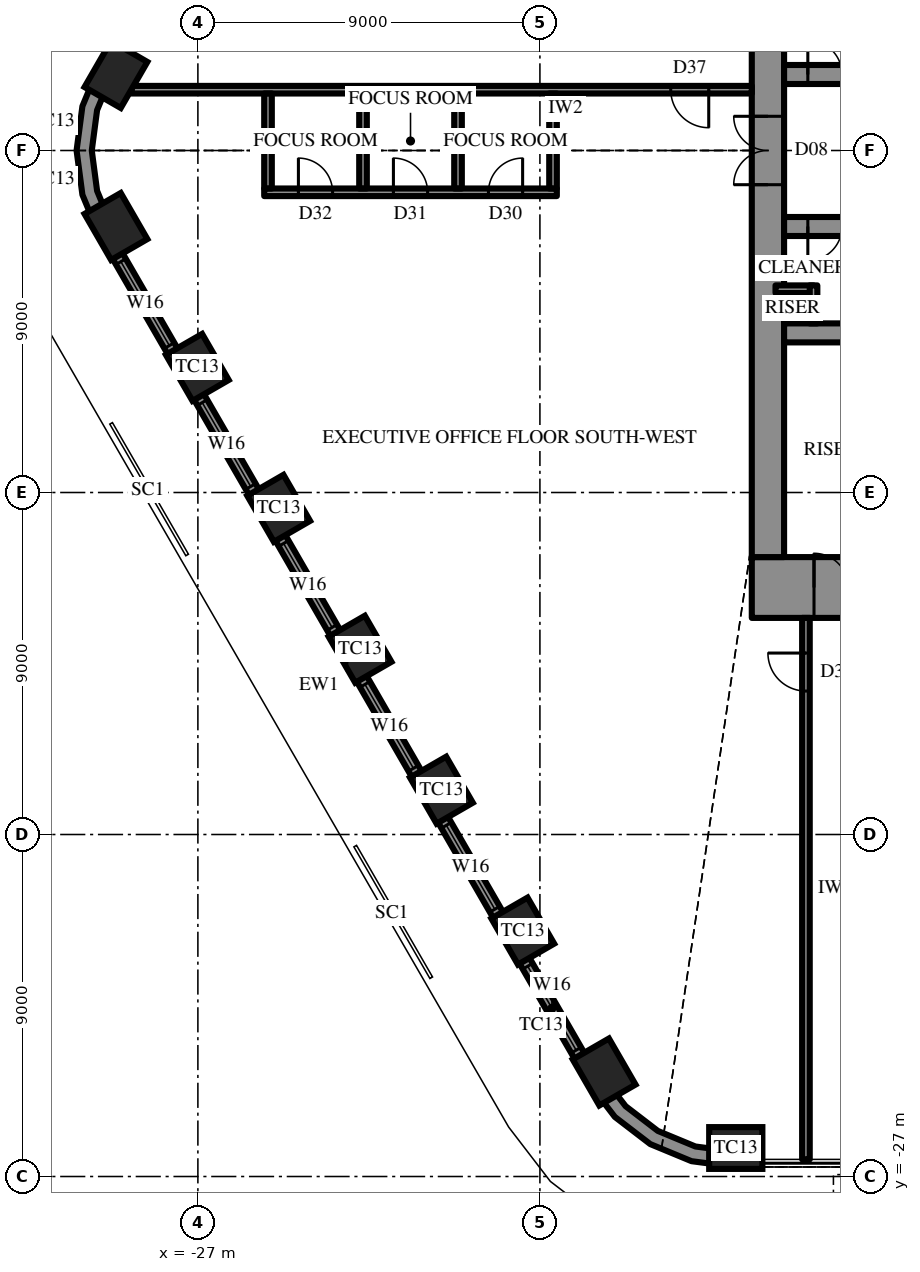
"""IFC4 building model, lengths in metres.
Left out: names, types, materials, properties, quantities, classifications, styles, units other than length and angle.
Written with IfcOpenShell. Run it as: python <this file> out.ifc"""

import sys

from ifc_helpers import new_model, si_unit, direction, frame, frame_2d, origin, origin_2d, place, context, subcontext, project, spatial, polyline, rectangle, outline, extrude, element, fill, save


model = new_model("IFC4")
c1 = context("Model", 3, precision=1e-05, world=origin(), true_north=direction((0.0, 1.0)))
c2 = subcontext(c1, "Body", "Model", "MODEL_VIEW")
j1 = project(units=[si_unit("LENGTHUNIT", "METRE"), si_unit("PLANEANGLEUNIT", "RADIAN")], contexts=[c1])
p1 = place(None, origin())
s1 = spatial("IfcSite", under=j1, at=p1, CompositionType="ELEMENT")
p2 = place(p1, origin())
s2 = spatial("IfcBuilding", under=s1, at=p2, CompositionType="ELEMENT")
p3 = place(p2, frame((0.0, 0.0, 319.9)))
s3 = spatial("IfcBuildingStorey", under=s2, at=p3, CompositionType="ELEMENT", Elevation=319.9)
for number, where, z_axis, x_axis in (
    (1, (-29.156, 2.0, 0.0), (0.0, 0.0, 1.0), (-0.5, -0.866, 0.0)),
    (2, (-29.156, -2.0, 0.0), (0.0, 0.0, 1.0), (0.5, -0.866, 0.0)),
    (3, (-27.015, -5.708, 0.0), (0.0, 0.0, 1.0), (0.5, -0.866, 0.0)),
    (4, (-24.874, -9.417, 0.0), (0.0, 0.0, 1.0), (0.5, -0.866, 0.0)),
    (5, (-22.733, -13.125, 0.0), (0.0, 0.0, 1.0), (0.5, -0.866, 0.0)),
    (6, (-20.592, -16.833, 0.0), (0.0, 0.0, 1.0), (0.5, -0.866, 0.0)),
    (7, (-18.451, -20.542, 0.0), (0.0, 0.0, 1.0), (0.5, -0.866, 0.0)),
    (8, (-16.31, -24.25, 0.0), (0.0, 0.0, 1.0), (0.5, -0.866, 0.0)),
    (9, (-12.846, -26.25, 0.0), (0.0, 0.0, 1.0), (1.0, 0.0, 0.0)),
):
    element("IfcColumn", number, at=place(p3, frame(where, z_axis=z_axis, x_axis=x_axis)), inside=s3, PredefinedType="COLUMN", context=c2, shape_type="SweptSolid", body=[
        extrude(rectangle(XDim=1.4, YDim=1.1, at=origin_2d()), origin(), (0.0, 0.0, 1.0), 4.2),
    ])
p4 = place(p3, frame((12.425, -11.5, 0.0), z_axis=(0.0, 0.0, 1.0), x_axis=(-1.0, 0.0, 0.0)))
e10 = element("IfcWall", 10, at=p4, inside=s3, PredefinedType="SHEAR", context=c2, shape_type="SweptSolid", body=[
    extrude(rectangle(XDim=24.85, YDim=1.6, at=frame_2d((12.425, 0.0))), origin(), (0.0, 0.0, 1.0), 4.2),
])
p5 = place(p4, frame((13.275, 0.0, 0.0)))
e11 = element("IfcOpeningElement", 11, at=p5, cuts=e10, PredefinedType="OPENING", context=c2, shape_type="SweptSolid", body=[
    extrude(rectangle(XDim=0.9, YDim=2.2, at=frame_2d((0.45, 1.1))), frame((0.0, 0.81, 0.0), z_axis=(0.0, -1.0, 0.0), x_axis=(1.0, 0.0, 0.0)), (0.0, 0.0, 1.0), 1.62),
])
p6 = place(p4, frame((16.275, 0.0, 0.0)))
e12 = element("IfcOpeningElement", 12, at=p6, cuts=e10, PredefinedType="OPENING", context=c2, shape_type="SweptSolid", body=[
    extrude(rectangle(XDim=0.9, YDim=2.2, at=frame_2d((0.45, 1.1))), frame((0.0, 0.81, 0.0), z_axis=(0.0, -1.0, 0.0), x_axis=(1.0, 0.0, 0.0)), (0.0, 0.0, 1.0), 1.62),
])
p7 = place(p4, frame((19.325, 0.0, 0.0)))
e13 = element("IfcOpeningElement", 13, at=p7, cuts=e10, PredefinedType="OPENING", context=c2, shape_type="SweptSolid", body=[
    extrude(rectangle(XDim=1.0, YDim=2.2, at=frame_2d((0.5, 1.1))), frame((0.0, 0.81, 0.0), z_axis=(0.0, -1.0, 0.0), x_axis=(1.0, 0.0, 0.0)), (0.0, 0.0, 1.0), 1.62),
])
p8 = place(p4, frame((1.637, 0.0, 0.0)))
e14 = element("IfcOpeningElement", 14, at=p8, cuts=e10, PredefinedType="OPENING", context=c2, shape_type="SweptSolid", body=[
    extrude(rectangle(XDim=0.9, YDim=2.2, at=frame_2d((0.45, 1.1))), frame((0.0, 0.81, 0.0), z_axis=(0.0, -1.0, 0.0), x_axis=(1.0, 0.0, 0.0)), (0.0, 0.0, 1.0), 1.62),
])
p9 = place(p4, frame((22.312, 0.0, 0.0)))
e15 = element("IfcOpeningElement", 15, at=p9, cuts=e10, PredefinedType="OPENING", context=c2, shape_type="SweptSolid", body=[
    extrude(rectangle(XDim=0.9, YDim=2.2, at=frame_2d((0.45, 1.1))), frame((0.0, 0.81, 0.0), z_axis=(0.0, -1.0, 0.0), x_axis=(1.0, 0.0, 0.0)), (0.0, 0.0, 1.0), 1.62),
])
p10 = place(p3, frame((-12.0, 10.7, 0.0), z_axis=(0.0, 0.0, 1.0), x_axis=(0.0, -1.0, 0.0)))
e16 = element("IfcWall", 16, at=p10, inside=s3, PredefinedType="SHEAR", context=c2, shape_type="SweptSolid", body=[
    extrude(rectangle(XDim=21.4, YDim=0.85, at=frame_2d((10.7, 0.0))), origin(), (0.0, 0.0, 1.0), 4.2),
])
p11 = place(p10, frame((9.8, 0.0, 0.0)))
e17 = element("IfcOpeningElement", 17, at=p11, cuts=e16, PredefinedType="OPENING", context=c2, shape_type="SweptSolid", body=[
    extrude(rectangle(XDim=1.8, YDim=2.4, at=frame_2d((0.9, 1.2))), frame((0.0, 0.435, 0.0), z_axis=(0.0, -1.0, 0.0), x_axis=(1.0, 0.0, 0.0)), (0.0, 0.0, 1.0), 0.87),
])
p12 = place(p3, frame((-11.575, 2.0, 0.0), z_axis=(0.0, 0.0, 1.0), x_axis=(1.0, 0.0, 0.0)))
e18 = element("IfcWall", 18, at=p12, inside=s3, PredefinedType="SHEAR", context=c2, shape_type="SweptSolid", body=[
    extrude(rectangle(XDim=5.775, YDim=0.5, at=frame_2d((2.887, 0.0))), origin(), (0.0, 0.0, 1.0), 4.2),
])
p13 = place(p12, frame((0.625, 0.0, 0.0)))
e19 = element("IfcOpeningElement", 19, at=p13, cuts=e18, PredefinedType="OPENING", context=c2, shape_type="SweptSolid", body=[
    extrude(rectangle(XDim=0.9, YDim=2.2, at=frame_2d((0.45, 1.1))), frame((0.0, 0.26, 0.0), z_axis=(0.0, -1.0, 0.0), x_axis=(1.0, 0.0, 0.0)), (0.0, 0.0, 1.0), 0.52),
])
p14 = place(p3, frame((3.2, -2.0, 0.0), z_axis=(0.0, 0.0, 1.0), x_axis=(-1.0, 0.0, 0.0)))
e20 = element("IfcWall", 20, at=p14, inside=s3, PredefinedType="SHEAR", context=c2, shape_type="SweptSolid", body=[
    extrude(rectangle(XDim=14.775, YDim=0.5, at=frame_2d((7.387, 0.0))), origin(), (0.0, 0.0, 1.0), 4.2),
])
p15 = place(p14, frame((13.25, 0.0, 0.0)))
e21 = element("IfcOpeningElement", 21, at=p15, cuts=e20, PredefinedType="OPENING", context=c2, shape_type="SweptSolid", body=[
    extrude(rectangle(XDim=0.9, YDim=2.2, at=frame_2d((0.45, 1.1))), frame((0.0, 0.26, 0.0), z_axis=(0.0, -1.0, 0.0), x_axis=(1.0, 0.0, 0.0)), (0.0, 0.0, 1.0), 0.52),
])
p16 = place(p14, frame((1.15, 0.0, 0.0)))
e22 = element("IfcOpeningElement", 22, at=p16, cuts=e20, PredefinedType="OPENING", context=c2, shape_type="SweptSolid", body=[
    extrude(rectangle(XDim=1.1, YDim=2.2, at=frame_2d((0.55, 1.1))), frame((0.0, 0.26, 0.0), z_axis=(0.0, -1.0, 0.0), x_axis=(1.0, 0.0, 0.0)), (0.0, 0.0, 1.0), 0.52),
])
p17 = place(p14, frame((4.15, 0.0, 0.0)))
e23 = element("IfcOpeningElement", 23, at=p17, cuts=e20, PredefinedType="OPENING", context=c2, shape_type="SweptSolid", body=[
    extrude(rectangle(XDim=1.1, YDim=2.2, at=frame_2d((0.55, 1.1))), frame((0.0, 0.26, 0.0), z_axis=(0.0, -1.0, 0.0), x_axis=(1.0, 0.0, 0.0)), (0.0, 0.0, 1.0), 0.52),
])
p18 = place(p14, frame((7.15, 0.0, 0.0)))
e24 = element("IfcOpeningElement", 24, at=p18, cuts=e20, PredefinedType="OPENING", context=c2, shape_type="SweptSolid", body=[
    extrude(rectangle(XDim=1.1, YDim=2.2, at=frame_2d((0.55, 1.1))), frame((0.0, 0.26, 0.0), z_axis=(0.0, -1.0, 0.0), x_axis=(1.0, 0.0, 0.0)), (0.0, 0.0, 1.0), 0.52),
])
p19 = place(p14, frame((10.15, 0.0, 0.0)))
e25 = element("IfcOpeningElement", 25, at=p19, cuts=e20, PredefinedType="OPENING", context=c2, shape_type="SweptSolid", body=[
    extrude(rectangle(XDim=1.1, YDim=2.2, at=frame_2d((0.55, 1.1))), frame((0.0, 0.26, 0.0), z_axis=(0.0, -1.0, 0.0), x_axis=(1.0, 0.0, 0.0)), (0.0, 0.0, 1.0), 0.52),
])
p20 = place(p3, frame((11.575, -4.8, 0.0), z_axis=(0.0, 0.0, 1.0), x_axis=(-1.0, 0.0, 0.0)))
e26 = element("IfcWall", 26, at=p20, inside=s3, PredefinedType="SHEAR", context=c2, shape_type="SweptSolid", body=[
    extrude(rectangle(XDim=23.15, YDim=0.5, at=frame_2d((11.575, 0.0))), origin(), (0.0, 0.0, 1.0), 4.2),
])
p21 = place(p20, frame((6.475, 0.0, 0.0)))
e27 = element("IfcOpeningElement", 27, at=p21, cuts=e26, PredefinedType="OPENING", context=c2, shape_type="SweptSolid", body=[
    extrude(rectangle(XDim=1.2, YDim=2.2, at=frame_2d((0.6, 1.1))), frame((0.0, 0.26, 0.0), z_axis=(0.0, -1.0, 0.0), x_axis=(1.0, 0.0, 0.0)), (0.0, 0.0, 1.0), 0.52),
])
p22 = place(p20, frame((3.475, 0.0, 0.0)))
e28 = element("IfcOpeningElement", 28, at=p22, cuts=e26, PredefinedType="OPENING", context=c2, shape_type="SweptSolid", body=[
    extrude(rectangle(XDim=1.2, YDim=2.2, at=frame_2d((0.6, 1.1))), frame((0.0, 0.26, 0.0), z_axis=(0.0, -1.0, 0.0), x_axis=(1.0, 0.0, 0.0)), (0.0, 0.0, 1.0), 0.52),
])
p23 = place(p3, origin())
e29 = element("IfcWall", 29, at=p23, inside=s3, PredefinedType="SOLIDWALL", context=c2, shape_type="SweptSolid", body=[
    extrude(outline(polyline([(-29.589, 2.25), (-30.039, 1.165), (-30.192, 0.0), (-30.039, -1.165), (-29.589, -2.25), (-29.243, -2.05), (-29.652, -1.061), (-29.792, 0.0), (-29.652, 1.061), (-29.243, 2.05), (-29.589, 2.25)])), origin(), (0.0, 0.0, 1.0), 2.0),
])
p24 = place(p3, origin())
e30 = element("IfcWall", 30, at=p24, inside=s3, PredefinedType="SOLIDWALL", context=c2, shape_type="SweptSolid", body=[
    extrude(outline(polyline([(-16.743, -24.5), (-16.028, -25.432), (-15.096, -26.147), (-14.011, -26.597), (-12.846, -26.75), (-12.846, -26.35), (-13.907, -26.21), (-14.896, -25.801), (-15.745, -25.149), (-16.397, -24.3), (-16.743, -24.5)])), origin(), (0.0, 0.0, 1.0), 2.0),
])
p25 = place(p3, frame((-29.459, -2.175, 0.0), z_axis=(0.0, 0.0, 1.0), x_axis=(0.499997191038, -0.866027025533, 0.0)))
e31 = element("IfcWall", 31, at=p25, inside=s3, PredefinedType="SOLIDWALL", context=c2, shape_type="SweptSolid", body=[
    extrude(rectangle(XDim=25.692, YDim=0.3, at=frame_2d((12.846, 0.0))), origin(), (0.0, 0.0, 1.0), 2.0),
])
p26 = place(p25, frame((0.866, 0.0, 0.6)))
e32 = element("IfcOpeningElement", 32, at=p26, cuts=e31, PredefinedType="OPENING", context=c2, shape_type="SweptSolid", body=[
    extrude(rectangle(XDim=2.55, YDim=1.15, at=frame_2d((1.275, 0.575))), frame((0.0, 0.16, 0.0), z_axis=(0.0, -1.0, 0.0), x_axis=(1.0, 0.0, 0.0)), (0.0, 0.0, 1.0), 0.32),
])
p27 = place(p25, frame((5.148, 0.0, 0.6)))
e33 = element("IfcOpeningElement", 33, at=p27, cuts=e31, PredefinedType="OPENING", context=c2, shape_type="SweptSolid", body=[
    extrude(rectangle(XDim=2.55, YDim=1.15, at=frame_2d((1.275, 0.575))), frame((0.0, 0.16, 0.0), z_axis=(0.0, -1.0, 0.0), x_axis=(1.0, 0.0, 0.0)), (0.0, 0.0, 1.0), 0.32),
])
p28 = place(p25, frame((9.43, 0.0, 0.6)))
e34 = element("IfcOpeningElement", 34, at=p28, cuts=e31, PredefinedType="OPENING", context=c2, shape_type="SweptSolid", body=[
    extrude(rectangle(XDim=2.55, YDim=1.15, at=frame_2d((1.275, 0.575))), frame((0.0, 0.16, 0.0), z_axis=(0.0, -1.0, 0.0), x_axis=(1.0, 0.0, 0.0)), (0.0, 0.0, 1.0), 0.32),
])
p29 = place(p25, frame((13.712, 0.0, 0.6)))
e35 = element("IfcOpeningElement", 35, at=p29, cuts=e31, PredefinedType="OPENING", context=c2, shape_type="SweptSolid", body=[
    extrude(rectangle(XDim=2.55, YDim=1.15, at=frame_2d((1.275, 0.575))), frame((0.0, 0.16, 0.0), z_axis=(0.0, -1.0, 0.0), x_axis=(1.0, 0.0, 0.0)), (0.0, 0.0, 1.0), 0.32),
])
p30 = place(p25, frame((17.994, 0.0, 0.6)))
e36 = element("IfcOpeningElement", 36, at=p30, cuts=e31, PredefinedType="OPENING", context=c2, shape_type="SweptSolid", body=[
    extrude(rectangle(XDim=2.55, YDim=1.15, at=frame_2d((1.275, 0.575))), frame((0.0, 0.16, 0.0), z_axis=(0.0, -1.0, 0.0), x_axis=(1.0, 0.0, 0.0)), (0.0, 0.0, 1.0), 0.32),
])
p31 = place(p25, frame((22.276, 0.0, 0.6)))
e37 = element("IfcOpeningElement", 37, at=p31, cuts=e31, PredefinedType="OPENING", context=c2, shape_type="SweptSolid", body=[
    extrude(rectangle(XDim=2.55, YDim=1.15, at=frame_2d((1.275, 0.575))), frame((0.0, 0.16, 0.0), z_axis=(0.0, -1.0, 0.0), x_axis=(1.0, 0.0, 0.0)), (0.0, 0.0, 1.0), 0.32),
])
for number, where, z_axis, x_axis in (
    (38, (-10.8, -3.65, 0.0), (0.0, 0.0, 1.0), (-1.0, 0.0, 0.0)),
    (39, (-10.8, -3.55, 0.0), (0.0, 0.0, 1.0), (0.0, -1.0, 0.0)),
):
    element("IfcWall", number, at=place(p3, frame(where, z_axis=z_axis, x_axis=x_axis)), inside=s3, PredefinedType="PARTITIONING", context=c2, shape_type="SweptSolid", body=[
        extrude(rectangle(XDim=1.0, YDim=0.2, at=frame_2d((0.5, 0.0))), origin(), (0.0, 0.0, 1.0), 4.0),
    ])
p32 = place(p3, frame((-11.0, -12.3, 0.0), z_axis=(0.0, 0.0, 1.0), x_axis=(0.0, -1.0, 0.0)))
e40 = element("IfcWall", 40, at=p32, inside=s3, PredefinedType="PARTITIONING", context=c2, shape_type="SweptSolid", body=[
    extrude(rectangle(XDim=14.25, YDim=0.2, at=frame_2d((7.125, 0.0))), origin(), (0.0, 0.0, 1.0), 4.0),
])
p33 = place(p32, frame((0.925, 0.0, 0.0)))
e41 = element("IfcOpeningElement", 41, at=p33, cuts=e40, PredefinedType="OPENING", context=c2, shape_type="SweptSolid", body=[
    extrude(rectangle(XDim=1.0, YDim=2.2, at=frame_2d((0.5, 1.1))), frame((0.0, 0.11, 0.0), z_axis=(0.0, -1.0, 0.0), x_axis=(1.0, 0.0, 0.0)), (0.0, 0.0, 1.0), 0.22),
])
p34 = place(p3, frame((-12.425, 1.6, 0.0), z_axis=(0.0, 0.0, 1.0), x_axis=(-1.0, 0.0, 0.0)))
e42 = element("IfcWall", 42, at=p34, inside=s3, PredefinedType="PARTITIONING", context=c2, shape_type="SweptSolid", body=[
    extrude(rectangle(XDim=16.327, YDim=0.2, at=frame_2d((8.164, 0.0))), origin(), (0.0, 0.0, 1.0), 4.0),
])
p35 = place(p34, frame((1.133, 0.0, 0.0)))
e43 = element("IfcOpeningElement", 43, at=p35, cuts=e42, PredefinedType="OPENING", context=c2, shape_type="SweptSolid", body=[
    extrude(rectangle(XDim=1.0, YDim=2.2, at=frame_2d((0.5, 1.1))), frame((0.0, 0.11, 0.0), z_axis=(0.0, -1.0, 0.0), x_axis=(1.0, 0.0, 0.0)), (0.0, 0.0, 1.0), 0.22),
])
p36 = place(p3, frame((-17.555, -1.1, 0.0), z_axis=(0.0, 0.0, 1.0), x_axis=(-1.0, 0.0, 0.0)))
e44 = element("IfcWall", 44, at=p36, inside=s3, PredefinedType="PARTITIONING", context=c2, shape_type="SweptSolid", body=[
    extrude(rectangle(XDim=7.7, YDim=0.2, at=frame_2d((3.85, 0.0))), origin(), (0.0, 0.0, 1.0), 4.0),
])
p37 = place(p36, frame((0.9, 0.0, 0.0)))
e45 = element("IfcOpeningElement", 45, at=p37, cuts=e44, PredefinedType="OPENING", context=c2, shape_type="SweptSolid", body=[
    extrude(rectangle(XDim=0.9, YDim=2.2, at=frame_2d((0.45, 1.1))), frame((0.0, 0.11, 0.0), z_axis=(0.0, -1.0, 0.0), x_axis=(1.0, 0.0, 0.0)), (0.0, 0.0, 1.0), 0.22),
])
p38 = place(p36, frame((3.4, 0.0, 0.0)))
e46 = element("IfcOpeningElement", 46, at=p38, cuts=e44, PredefinedType="OPENING", context=c2, shape_type="SweptSolid", body=[
    extrude(rectangle(XDim=0.9, YDim=2.2, at=frame_2d((0.45, 1.1))), frame((0.0, 0.11, 0.0), z_axis=(0.0, -1.0, 0.0), x_axis=(1.0, 0.0, 0.0)), (0.0, 0.0, 1.0), 0.22),
])
p39 = place(p36, frame((5.9, 0.0, 0.0)))
e47 = element("IfcOpeningElement", 47, at=p39, cuts=e44, PredefinedType="OPENING", context=c2, shape_type="SweptSolid", body=[
    extrude(rectangle(XDim=0.9, YDim=2.2, at=frame_2d((0.45, 1.1))), frame((0.0, 0.11, 0.0), z_axis=(0.0, -1.0, 0.0), x_axis=(1.0, 0.0, 0.0)), (0.0, 0.0, 1.0), 0.22),
])
for number, where, z_axis, x_axis in (
    (48, (-17.655, 1.5, 0.0), (0.0, 0.0, 1.0), (0.0, -1.0, 0.0)),
    (49, (-20.155, 1.5, 0.0), (0.0, 0.0, 1.0), (0.0, -1.0, 0.0)),
    (50, (-22.655, 1.5, 0.0), (0.0, 0.0, 1.0), (0.0, -1.0, 0.0)),
    (51, (-25.155, 1.5, 0.0), (0.0, 0.0, 1.0), (0.0, -1.0, 0.0)),
):
    element("IfcWall", number, at=place(p3, frame(where, z_axis=z_axis, x_axis=x_axis)), inside=s3, PredefinedType="PARTITIONING", context=c2, shape_type="SweptSolid", body=[
        extrude(rectangle(XDim=2.5, YDim=0.2, at=frame_2d((1.25, 0.0))), origin(), (0.0, 0.0, 1.0), 4.0),
    ])
p40 = place(p26, origin())
e52 = element("IfcWindow", 52, at=p40, inside=s3, PartitioningType="SINGLE_PANEL", PredefinedType="WINDOW", context=c2, shape_type="SweptSolid", body=[
    extrude(rectangle(XDim=2.55, YDim=1.15, at=frame_2d((1.275, 0.575))), frame((0.0, 0.03, 0.0), z_axis=(0.0, -1.0, 0.0), x_axis=(1.0, 0.0, 0.0)), (0.0, 0.0, 1.0), 0.06),
])
fill(e32, e52)
p41 = place(p27, origin())
e53 = element("IfcWindow", 53, at=p41, inside=s3, PartitioningType="SINGLE_PANEL", PredefinedType="WINDOW", context=c2, shape_type="SweptSolid", body=[
    extrude(rectangle(XDim=2.55, YDim=1.15, at=frame_2d((1.275, 0.575))), frame((0.0, 0.03, 0.0), z_axis=(0.0, -1.0, 0.0), x_axis=(1.0, 0.0, 0.0)), (0.0, 0.0, 1.0), 0.06),
])
fill(e33, e53)
p42 = place(p28, origin())
e54 = element("IfcWindow", 54, at=p42, inside=s3, PartitioningType="SINGLE_PANEL", PredefinedType="WINDOW", context=c2, shape_type="SweptSolid", body=[
    extrude(rectangle(XDim=2.55, YDim=1.15, at=frame_2d((1.275, 0.575))), frame((0.0, 0.03, 0.0), z_axis=(0.0, -1.0, 0.0), x_axis=(1.0, 0.0, 0.0)), (0.0, 0.0, 1.0), 0.06),
])
fill(e34, e54)
p43 = place(p29, origin())
e55 = element("IfcWindow", 55, at=p43, inside=s3, PartitioningType="SINGLE_PANEL", PredefinedType="WINDOW", context=c2, shape_type="SweptSolid", body=[
    extrude(rectangle(XDim=2.55, YDim=1.15, at=frame_2d((1.275, 0.575))), frame((0.0, 0.03, 0.0), z_axis=(0.0, -1.0, 0.0), x_axis=(1.0, 0.0, 0.0)), (0.0, 0.0, 1.0), 0.06),
])
fill(e35, e55)
p44 = place(p30, origin())
e56 = element("IfcWindow", 56, at=p44, inside=s3, PartitioningType="SINGLE_PANEL", PredefinedType="WINDOW", context=c2, shape_type="SweptSolid", body=[
    extrude(rectangle(XDim=2.55, YDim=1.15, at=frame_2d((1.275, 0.575))), frame((0.0, 0.03, 0.0), z_axis=(0.0, -1.0, 0.0), x_axis=(1.0, 0.0, 0.0)), (0.0, 0.0, 1.0), 0.06),
])
fill(e36, e56)
p45 = place(p31, origin())
e57 = element("IfcWindow", 57, at=p45, inside=s3, PartitioningType="SINGLE_PANEL", PredefinedType="WINDOW", context=c2, shape_type="SweptSolid", body=[
    extrude(rectangle(XDim=2.55, YDim=1.15, at=frame_2d((1.275, 0.575))), frame((0.0, 0.03, 0.0), z_axis=(0.0, -1.0, 0.0), x_axis=(1.0, 0.0, 0.0)), (0.0, 0.0, 1.0), 0.06),
])
fill(e37, e57)
p46 = place(p11, frame((1.8, 0.0, 0.0), z_axis=(0.0, 0.0, 1.0), x_axis=(-1.0, 0.0, 0.0)))
e58 = element("IfcDoor", 58, at=p46, inside=s3, OperationType="DOUBLE_DOOR_SINGLE_SWING", PredefinedType="DOOR", context=c2, shape_type="SweptSolid", body=[
    extrude(rectangle(XDim=1.8, YDim=2.4, at=frame_2d((0.9, 1.2))), frame((0.0, 0.025, 0.0), z_axis=(0.0, -1.0, 0.0), x_axis=(1.0, 0.0, 0.0)), (0.0, 0.0, 1.0), 0.05),
])
fill(e17, e58)
p47 = place(p9, frame((0.9, 0.0, 0.0), z_axis=(0.0, 0.0, 1.0), x_axis=(-1.0, 0.0, 0.0)))
e59 = element("IfcDoor", 59, at=p47, inside=s3, OperationType="SINGLE_SWING_RIGHT", PredefinedType="DOOR", context=c2, shape_type="SweptSolid", body=[
    extrude(rectangle(XDim=0.9, YDim=2.2, at=frame_2d((0.45, 1.1))), frame((0.0, 0.025, 0.0), z_axis=(0.0, -1.0, 0.0), x_axis=(1.0, 0.0, 0.0)), (0.0, 0.0, 1.0), 0.05),
])
fill(e15, e59)
p48 = place(p13, origin())
e60 = element("IfcDoor", 60, at=p48, inside=s3, OperationType="SINGLE_SWING_RIGHT", PredefinedType="DOOR", context=c2, shape_type="SweptSolid", body=[
    extrude(rectangle(XDim=0.9, YDim=2.2, at=frame_2d((0.45, 1.1))), frame((0.0, 0.025, 0.0), z_axis=(0.0, -1.0, 0.0), x_axis=(1.0, 0.0, 0.0)), (0.0, 0.0, 1.0), 0.05),
])
fill(e19, e60)
p49 = place(p15, origin())
e61 = element("IfcDoor", 61, at=p49, inside=s3, OperationType="SINGLE_SWING_LEFT", PredefinedType="DOOR", context=c2, shape_type="SweptSolid", body=[
    extrude(rectangle(XDim=0.9, YDim=2.2, at=frame_2d((0.45, 1.1))), frame((0.0, 0.025, 0.0), z_axis=(0.0, -1.0, 0.0), x_axis=(1.0, 0.0, 0.0)), (0.0, 0.0, 1.0), 0.05),
])
fill(e21, e61)
p50 = place(p33, frame((1.0, 0.0, 0.0), z_axis=(0.0, 0.0, 1.0), x_axis=(-1.0, 0.0, 0.0)))
e62 = element("IfcDoor", 62, at=p50, inside=s3, OperationType="SINGLE_SWING_LEFT", PredefinedType="DOOR", context=c2, shape_type="SweptSolid", body=[
    extrude(rectangle(XDim=1.0, YDim=2.2, at=frame_2d((0.5, 1.1))), frame((0.0, 0.025, 0.0), z_axis=(0.0, -1.0, 0.0), x_axis=(1.0, 0.0, 0.0)), (0.0, 0.0, 1.0), 0.05),
])
fill(e41, e62)
p51 = place(p35, origin())
e63 = element("IfcDoor", 63, at=p51, inside=s3, OperationType="SINGLE_SWING_RIGHT", PredefinedType="DOOR", context=c2, shape_type="SweptSolid", body=[
    extrude(rectangle(XDim=1.0, YDim=2.2, at=frame_2d((0.5, 1.1))), frame((0.0, 0.025, 0.0), z_axis=(0.0, -1.0, 0.0), x_axis=(1.0, 0.0, 0.0)), (0.0, 0.0, 1.0), 0.05),
])
fill(e43, e63)
p52 = place(p37, frame((0.9, 0.0, 0.0), z_axis=(0.0, 0.0, 1.0), x_axis=(-1.0, 0.0, 0.0)))
e64 = element("IfcDoor", 64, at=p52, inside=s3, OperationType="SINGLE_SWING_LEFT", PredefinedType="DOOR", context=c2, shape_type="SweptSolid", body=[
    extrude(rectangle(XDim=0.9, YDim=2.2, at=frame_2d((0.45, 1.1))), frame((0.0, 0.025, 0.0), z_axis=(0.0, -1.0, 0.0), x_axis=(1.0, 0.0, 0.0)), (0.0, 0.0, 1.0), 0.05),
])
fill(e45, e64)
p53 = place(p38, frame((0.9, 0.0, 0.0), z_axis=(0.0, 0.0, 1.0), x_axis=(-1.0, 0.0, 0.0)))
e65 = element("IfcDoor", 65, at=p53, inside=s3, OperationType="SINGLE_SWING_RIGHT", PredefinedType="DOOR", context=c2, shape_type="SweptSolid", body=[
    extrude(rectangle(XDim=0.9, YDim=2.2, at=frame_2d((0.45, 1.1))), frame((0.0, 0.025, 0.0), z_axis=(0.0, -1.0, 0.0), x_axis=(1.0, 0.0, 0.0)), (0.0, 0.0, 1.0), 0.05),
])
fill(e46, e65)
p54 = place(p39, frame((0.9, 0.0, 0.0), z_axis=(0.0, 0.0, 1.0), x_axis=(-1.0, 0.0, 0.0)))
e66 = element("IfcDoor", 66, at=p54, inside=s3, OperationType="SINGLE_SWING_RIGHT", PredefinedType="DOOR", context=c2, shape_type="SweptSolid", body=[
    extrude(rectangle(XDim=0.9, YDim=2.2, at=frame_2d((0.45, 1.1))), frame((0.0, 0.025, 0.0), z_axis=(0.0, -1.0, 0.0), x_axis=(1.0, 0.0, 0.0)), (0.0, 0.0, 1.0), 0.05),
])
fill(e47, e66)
save(model, sys.argv[1])
